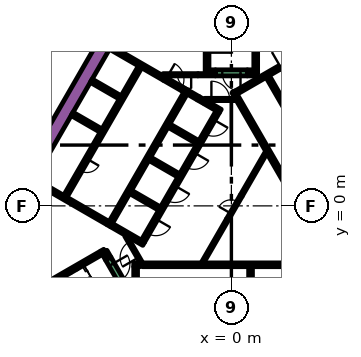
"""IFC4 building model, lengths in metres.
Left out: names, types, materials, properties, quantities, classifications, styles, units other than length and angle.
Written with IfcOpenShell. Run it as: python <this file> out.ifc"""

import sys

from ifc_helpers import new_model, si_unit, direction, frame, frame_2d, origin, place, context, subcontext, project, spatial, polyline, rectangle, outline, extrude, element, fill, save


model = new_model("IFC4")
c1 = context("Model", 3, precision=1e-05, world=origin(), true_north=direction((0.0, 1.0)))
c2 = subcontext(c1, "Body", "Model", "MODEL_VIEW")
j1 = project(units=[si_unit("LENGTHUNIT", "METRE"), si_unit("PLANEANGLEUNIT", "RADIAN")], contexts=[c1])
p1 = place(None, origin())
s1 = spatial("IfcSite", under=j1, at=p1, CompositionType="ELEMENT")
p2 = place(p1, origin())
s2 = spatial("IfcBuilding", under=s1, at=p2, CompositionType="ELEMENT")
p3 = place(p2, frame((0.0, 0.0, 6.0)))
s3 = spatial("IfcBuildingStorey", under=s2, at=p3, CompositionType="ELEMENT", Elevation=6.0)
p4 = place(p3, frame((-15.36, -1.503, 0.0), z_axis=(0.0, 0.0, 1.0), x_axis=(0.50000389221, 0.866023156604, 0.0)))
e1 = element("IfcWall", 1, at=p4, inside=s3, PredefinedType="SOLIDWALL", context=c2, shape_type="SweptSolid", body=[
    extrude(rectangle(XDim=21.0, YDim=0.9, at=frame_2d((10.5, 0.0))), origin(), (0.0, 0.0, 1.0), 5.4),
])
p5 = place(p3, frame((-12.134, -11.883, 0.0), z_axis=(0.0, 0.0, 1.0), x_axis=(-0.500005339912, 0.866022320763, 0.0)))
e2 = element("IfcWall", 2, at=p5, inside=s3, PredefinedType="SOLIDWALL", context=c2, shape_type="SweptSolid", body=[
    extrude(rectangle(XDim=9.488, YDim=0.9, at=frame_2d((4.744, 0.0))), origin(), (0.0, 0.0, 1.0), 5.4),
])
p6 = place(p3, frame((1.6, 8.95, 0.0), z_axis=(0.0, 0.0, 1.0), x_axis=(0.0, 1.0, 0.0)))
e3 = element("IfcWall", 3, at=p6, inside=s3, PredefinedType="SOLIDWALL", context=c2, shape_type="SweptSolid", body=[
    extrude(rectangle(XDim=6.8, YDim=0.25, at=frame_2d((3.4, 0.0))), origin(), (0.0, 0.0, 1.0), 5.4),
])
p7 = place(p3, frame((1.05, 8.825, 0.0), z_axis=(0.0, 0.0, 1.0), x_axis=(1.0, 0.0, 0.0)))
e4 = element("IfcWall", 4, at=p7, inside=s3, PredefinedType="SOLIDWALL", context=c2, shape_type="SweptSolid", body=[
    extrude(rectangle(XDim=0.675, YDim=0.25, at=frame_2d((0.337, 0.0))), origin(), (0.0, 0.0, 1.0), 5.4),
])
p8 = place(p3, frame((-1.6, 8.7, 0.0), z_axis=(0.0, 0.0, 1.0), x_axis=(0.0, 1.0, 0.0)))
e5 = element("IfcWall", 5, at=p8, inside=s3, PredefinedType="SOLIDWALL", context=c2, shape_type="SweptSolid", body=[
    extrude(rectangle(XDim=7.05, YDim=0.25, at=frame_2d((3.525, 0.0))), origin(), (0.0, 0.0, 1.0), 5.4),
])
p9 = place(p3, frame((-1.475, 8.825, 0.0), z_axis=(0.0, 0.0, 1.0), x_axis=(1.0, 0.0, 0.0)))
e6 = element("IfcWall", 6, at=p9, inside=s3, PredefinedType="SOLIDWALL", context=c2, shape_type="SweptSolid", body=[
    extrude(rectangle(XDim=0.425, YDim=0.25, at=frame_2d((0.212, 0.0))), origin(), (0.0, 0.0, 1.0), 5.4),
])
p10 = place(p3, frame((-14.44, -6.49, 0.0), z_axis=(0.0, 0.0, 1.0), x_axis=(0.866022966069, 0.500004222222, 0.0)))
e7 = element("IfcWall", 7, at=p10, inside=s3, PredefinedType="SOLIDWALL", context=c2, shape_type="SweptSolid", body=[
    extrude(rectangle(XDim=6.8, YDim=0.25, at=frame_2d((3.4, 0.0))), origin(), (0.0, 0.0, 1.0), 5.4),
])
p11 = place(p3, frame((-8.168, -3.503, 0.0), z_axis=(0.0, 0.0, 1.0), x_axis=(-0.499952099219, 0.866053057547, 0.0)))
e8 = element("IfcWall", 8, at=p11, inside=s3, PredefinedType="SOLIDWALL", context=c2, shape_type="SweptSolid", body=[
    extrude(rectangle(XDim=0.675, YDim=0.25, at=frame_2d((0.337, 0.0))), origin(), (0.0, 0.0, 1.0), 5.4),
])
p12 = place(p3, frame((-5.845, -3.875, 0.0), z_axis=(0.0, 0.0, 1.0), x_axis=(1.0, 0.0, 0.0)))
e9 = element("IfcWall", 9, at=p12, inside=s3, PredefinedType="SOLIDWALL", context=c2, shape_type="SweptSolid", body=[
    extrude(rectangle(XDim=12.27, YDim=0.25, at=frame_2d((6.135, 0.0))), origin(), (0.0, 0.0, 1.0), 5.4),
])
p13 = place(p3, frame((-6.425, -3.875, 0.0), z_axis=(0.0, 0.0, 1.0), x_axis=(1.0, 0.0, 0.0)))
e10 = element("IfcWall", 10, at=p13, inside=s3, PredefinedType="SOLIDWALL", context=c2, shape_type="SweptSolid", body=[
    extrude(rectangle(XDim=0.428, YDim=0.25, at=frame_2d((0.214, 0.0))), origin(), (0.0, 0.0, 1.0), 5.4),
])
p14 = place(p3, frame((1.26, -4.0, 0.0), z_axis=(0.0, 0.0, 1.0), x_axis=(0.0, -1.0, 0.0)))
e11 = element("IfcWall", 11, at=p14, inside=s3, PredefinedType="SOLIDWALL", context=c2, shape_type="SweptSolid", body=[
    extrude(rectangle(XDim=2.2, YDim=0.25, at=frame_2d((1.1, 0.0))), origin(), (0.0, 0.0, 1.0), 5.4),
])
p15 = place(p3, frame((-6.3, -4.0, 0.0), z_axis=(0.0, 0.0, 1.0), x_axis=(0.0, -1.0, 0.0)))
e12 = element("IfcWall", 12, at=p15, inside=s3, PredefinedType="SOLIDWALL", context=c2, shape_type="SweptSolid", body=[
    extrude(rectangle(XDim=3.154, YDim=0.25, at=frame_2d((1.577, 0.0))), origin(), (0.0, 0.0, 1.0), 5.4),
])
p16 = place(p3, origin())
e13 = element("IfcWall", 13, at=p16, inside=s3, PredefinedType="SOLIDWALL", context=c2, shape_type="SweptSolid", body=[
    extrude(outline(polyline([(6.552, -3.348), (6.677, -3.564), (6.46, -3.689), (4.897, -0.981), (0.332, 6.925), (0.335, 6.925), (0.335, 6.925), (0.335, 6.925), (0.335, 7.075), (0.335, 7.075), (0.335, 7.075), (0.245, 7.075), (0.079, 7.363), (0.035, 7.439), (0.252, 7.564), (0.377, 7.348), (6.552, -3.348)])), origin(), (0.0, 0.0, 1.0), 5.4),
])
p17 = place(p3, frame((0.314, 7.456, 0.0), z_axis=(0.0, 0.0, 1.0), x_axis=(0.866013897511, 0.50001992892, 0.0)))
e14 = element("IfcWall", 14, at=p17, inside=s3, PredefinedType="SOLIDWALL", context=c2, shape_type="SweptSolid", body=[
    extrude(rectangle(XDim=3.268, YDim=0.25, at=frame_2d((1.634, 0.0))), origin(), (0.0, 0.0, 1.0), 5.4),
])
p18 = place(p3, frame((-8.06, -1.311, 0.0), z_axis=(0.0, 0.0, 1.0), x_axis=(0.50000273126, 0.866023826885, 0.0)))
e15 = element("IfcWall", 15, at=p18, inside=s3, PredefinedType="SOLIDWALL", context=c2, shape_type="SweptSolid", body=[
    extrude(rectangle(XDim=10.33, YDim=0.25, at=frame_2d((5.165, 0.0))), origin(), (0.0, 0.0, 1.0), 5.4),
])
p19 = place(p3, frame((-1.819, 6.87, 0.0), z_axis=(0.0, 0.0, 1.0), x_axis=(-0.866294599386, 0.499533449405, 0.0)))
e16 = element("IfcWall", 16, at=p19, inside=s3, PredefinedType="SOLIDWALL", context=c2, shape_type="SweptSolid", body=[
    extrude(rectangle(XDim=0.41, YDim=0.25, at=frame_2d((0.205, 0.0))), origin(), (0.0, 0.0, 1.0), 5.4),
])
p20 = place(p3, frame((-2.849, 7.465, 0.0), z_axis=(0.0, 0.0, 1.0), x_axis=(0.865955664968, -0.500120771724, 0.0)))
e17 = element("IfcWall", 17, at=p20, inside=s3, PredefinedType="SOLIDWALL", context=c2, shape_type="SweptSolid", body=[
    extrude(rectangle(XDim=0.778, YDim=0.25, at=frame_2d((0.389, 0.0))), origin(), (0.0, 0.0, 1.0), 5.4),
])
p21 = place(p3, frame((-0.728, 6.24, 0.0), z_axis=(0.0, 0.0, 1.0), x_axis=(-0.866002680491, 0.500039355833, 0.0)))
e18 = element("IfcWall", 18, at=p21, inside=s3, PredefinedType="SOLIDWALL", context=c2, shape_type="SweptSolid", body=[
    extrude(rectangle(XDim=1.178, YDim=0.25, at=frame_2d((0.589, 0.0))), origin(), (0.0, 0.0, 1.0), 5.4),
])
for number, where, z_axis, x_axis in (
    (19, (-2.204, 4.182, 0.0), (0.0, 0.0, 1.0), (-0.866, 0.5, 0.0)),
    (20, (-5.369, 3.1, 0.0), (0.0, 0.0, 1.0), (0.866, -0.5, 0.0)),
    (21, (-4.724, -0.182, 0.0), (0.0, 0.0, 1.0), (-0.866, 0.5, 0.0)),
):
    element("IfcWall", number, at=place(p3, frame(where, z_axis=z_axis, x_axis=x_axis)), inside=s3, PredefinedType="SOLIDWALL", context=c2, shape_type="SweptSolid", body=[
        extrude(rectangle(XDim=2.2, YDim=0.25, at=frame_2d((1.1, 0.0))), origin(), (0.0, 0.0, 1.0), 5.4),
    ])
e22 = element("IfcWall", 22, at=p16, inside=s3, PredefinedType="SOLIDWALL", context=c2, shape_type="SweptSolid", body=[
    extrude(outline(polyline([(-5.922, -2.257), (-5.922, -2.257), (-5.705, -2.382), (-5.83, -2.598), (-6.829, -2.021), (-6.88, -1.934), (-6.88, -1.934), (-6.93, -1.963), (-7.952, -1.373), (-7.827, -1.156), (-5.922, -2.257)])), origin(), (0.0, 0.0, 1.0), 5.4),
])
p22 = place(p3, frame((-8.106, -1.14, 0.0), z_axis=(0.0, 0.0, 1.0), x_axis=(-0.866000643155, 0.500042884217, 0.0)))
e23 = element("IfcWall", 23, at=p22, inside=s3, PredefinedType="SOLIDWALL", context=c2, shape_type="SweptSolid", body=[
    extrude(rectangle(XDim=5.65, YDim=0.25, at=frame_2d((2.825, 0.0))), origin(), (0.0, 0.0, 1.0), 5.4),
])
e24 = element("IfcWall", 24, at=p16, inside=s3, PredefinedType="SOLIDWALL", context=c2, shape_type="SweptSolid", body=[
    extrude(outline(polyline([(-3.128, 7.481), (-3.259, 7.557), (-3.134, 7.773), (-3.003, 7.698), (-3.128, 7.481)])), origin(), (0.0, 0.0, 1.0), 5.4),
])
for number, where, z_axis, x_axis in (
    (25, (-8.574, 4.95, 0.0), (0.0, 0.0, 1.0), (-0.866, 0.5, 0.0)),
    (26, (-7.314, 7.132, 0.0), (0.0, 0.0, 1.0), (-0.866, 0.5, 0.0)),
):
    element("IfcWall", number, at=place(p3, frame(where, z_axis=z_axis, x_axis=x_axis)), inside=s3, PredefinedType="SOLIDWALL", context=c2, shape_type="SweptSolid", body=[
        extrude(rectangle(XDim=2.2, YDim=0.25, at=frame_2d((1.1, 0.0))), origin(), (0.0, 0.0, 1.0), 5.4),
    ])
p23 = place(p3, frame((-7.959, 10.415, 0.0), z_axis=(0.0, 0.0, 1.0), x_axis=(0.866020958405, -0.500007699544, 0.0)))
e27 = element("IfcWall", 27, at=p23, inside=s3, PredefinedType="SOLIDWALL", context=c2, shape_type="SweptSolid", body=[
    extrude(rectangle(XDim=4.1, YDim=0.25, at=frame_2d((2.05, 0.0))), origin(), (0.0, 0.0, 1.0), 5.4),
])
p24 = place(p3, frame((-8.252, -2.958, 0.0), z_axis=(0.0, 0.0, 1.0), x_axis=(0.500174715838, -0.865924508047, 0.0)))
e28 = element("IfcWall", 28, at=p24, inside=s3, PredefinedType="PARTITIONING", context=c2, shape_type="SweptSolid", body=[
    extrude(rectangle(XDim=0.514, YDim=0.15, at=frame_2d((0.257, 0.0))), origin(), (0.0, 0.0, 1.0), 4.5),
])
p25 = place(p3, frame((-3.997, 8.625, 0.0), z_axis=(0.0, 0.0, 1.0), x_axis=(-1.0, 0.0, 0.0)))
e29 = element("IfcWall", 29, at=p25, inside=s3, PredefinedType="PARTITIONING", context=c2, shape_type="SweptSolid", body=[
    extrude(rectangle(XDim=0.502, YDim=0.15, at=frame_2d((0.251, 0.0))), origin(), (0.0, 0.0, 1.0), 4.5),
])
p26 = place(p3, frame((-2.196, 8.625, 0.0), z_axis=(0.0, 0.0, 1.0), x_axis=(1.0, 0.0, 0.0)))
e30 = element("IfcWall", 30, at=p26, inside=s3, PredefinedType="PARTITIONING", context=c2, shape_type="SweptSolid", body=[
    extrude(rectangle(XDim=1.146, YDim=0.15, at=frame_2d((0.573, 0.0))), origin(), (0.0, 0.0, 1.0), 4.5),
])
for number, where, z_axis, x_axis in (
    (31, (-1.887, -3.718, 0.0), (0.0, 0.0, 1.0), (0.5, 0.866, 0.0)),
    (32, (0.645, 0.667, 0.0), (0.0, 0.0, 1.0), (0.5, 0.866, 0.0)),
):
    element("IfcWall", number, at=place(p3, frame(where, z_axis=z_axis, x_axis=x_axis)), inside=s3, PredefinedType="PARTITIONING", context=c2, shape_type="SweptSolid", body=[
        extrude(rectangle(XDim=3.263, YDim=0.15, at=frame_2d((1.632, 0.0))), origin(), (0.0, 0.0, 1.0), 4.5),
    ])
p27 = place(p3, frame((1.05, 8.625, 0.0), z_axis=(0.0, 0.0, 1.0), x_axis=(1.0, 0.0, 0.0)))
e33 = element("IfcWall", 33, at=p27, inside=s3, PredefinedType="PARTITIONING", context=c2, shape_type="SweptSolid", body=[
    extrude(rectangle(XDim=0.514, YDim=0.15, at=frame_2d((0.257, 0.0))), origin(), (0.0, 0.0, 1.0), 4.5),
])
p28 = place(p3, frame((8.565, -2.185, 0.0), z_axis=(0.0, 0.0, 1.0), x_axis=(-0.499997954832, 0.866026584559, 0.0)))
e34 = element("IfcWall", 34, at=p28, inside=s3, PredefinedType="SOLIDWALL", context=c2, shape_type="SweptSolid", body=[
    extrude(rectangle(XDim=12.35, YDim=0.25, at=frame_2d((6.175, 0.0))), origin(), (0.0, 0.0, 1.0), 5.4),
])
p29 = place(p28, frame((5.725, 0.0, 0.0)))
e35 = element("IfcOpeningElement", 35, at=p29, cuts=e34, PredefinedType="OPENING", context=c2, shape_type="SweptSolid", body=[
    extrude(rectangle(XDim=0.9, YDim=2.1, at=frame_2d((0.45, 1.05))), frame((0.0, 0.135, 0.0), z_axis=(0.0, -1.0, 0.0), x_axis=(1.0, 0.0, 0.0)), (0.0, 0.0, 1.0), 0.27),
])
p30 = place(p3, frame((-6.008, 9.144, 0.0), z_axis=(0.0, 0.0, 1.0), x_axis=(-0.500006956611, -0.866021387346, 0.0)))
e36 = element("IfcWall", 36, at=p30, inside=s3, PredefinedType="SOLIDWALL", context=c2, shape_type="SweptSolid", body=[
    extrude(rectangle(XDim=9.83, YDim=0.25, at=frame_2d((4.915, 0.0))), origin(), (0.0, 0.0, 1.0), 5.4),
])
p31 = place(p30, frame((6.985, 0.0, 0.0)))
e37 = element("IfcOpeningElement", 37, at=p31, cuts=e36, PredefinedType="OPENING", context=c2, shape_type="SweptSolid", body=[
    extrude(rectangle(XDim=0.9, YDim=2.1, at=frame_2d((0.45, 1.05))), frame((0.0, 0.135, 0.0), z_axis=(0.0, -1.0, 0.0), x_axis=(1.0, 0.0, 0.0)), (0.0, 0.0, 1.0), 0.27),
])
p32 = place(p3, frame((-0.898, 6.194, 0.0), z_axis=(0.0, 0.0, 1.0), x_axis=(-0.499996202215, -0.866027596426, 0.0)))
e38 = element("IfcWall", 38, at=p32, inside=s3, PredefinedType="SOLIDWALL", context=c2, shape_type="SweptSolid", body=[
    extrude(rectangle(XDim=9.83, YDim=0.25, at=frame_2d((4.915, 0.0))), origin(), (0.0, 0.0, 1.0), 5.4),
])
p33 = place(p32, frame((0.585, 0.0, 0.0)))
e39 = element("IfcOpeningElement", 39, at=p33, cuts=e38, PredefinedType="OPENING", context=c2, shape_type="SweptSolid", body=[
    extrude(rectangle(XDim=1.1, YDim=2.1, at=frame_2d((0.55, 1.05))), frame((0.0, 0.135, 0.0), z_axis=(0.0, -1.0, 0.0), x_axis=(1.0, 0.0, 0.0)), (0.0, 0.0, 1.0), 0.27),
])
p34 = place(p32, frame((3.105, 0.0, 0.0)))
e40 = element("IfcOpeningElement", 40, at=p34, cuts=e38, PredefinedType="OPENING", context=c2, shape_type="SweptSolid", body=[
    extrude(rectangle(XDim=1.1, YDim=2.1, at=frame_2d((0.55, 1.05))), frame((0.0, 0.135, 0.0), z_axis=(0.0, -1.0, 0.0), x_axis=(1.0, 0.0, 0.0)), (0.0, 0.0, 1.0), 0.27),
])
p35 = place(p32, frame((5.625, 0.0, 0.0)))
e41 = element("IfcOpeningElement", 41, at=p35, cuts=e38, PredefinedType="OPENING", context=c2, shape_type="SweptSolid", body=[
    extrude(rectangle(XDim=1.1, YDim=2.1, at=frame_2d((0.55, 1.05))), frame((0.0, 0.135, 0.0), z_axis=(0.0, -1.0, 0.0), x_axis=(1.0, 0.0, 0.0)), (0.0, 0.0, 1.0), 0.27),
])
p36 = place(p32, frame((8.145, 0.0, 0.0)))
e42 = element("IfcOpeningElement", 42, at=p36, cuts=e38, PredefinedType="OPENING", context=c2, shape_type="SweptSolid", body=[
    extrude(rectangle(XDim=1.1, YDim=2.1, at=frame_2d((0.55, 1.05))), frame((0.0, 0.135, 0.0), z_axis=(0.0, -1.0, 0.0), x_axis=(1.0, 0.0, 0.0)), (0.0, 0.0, 1.0), 0.27),
])
p37 = place(p3, frame((1.05, 8.75, 0.0), z_axis=(0.0, 0.0, 1.0), x_axis=(-1.0, 0.0, 0.0)))
e43 = element("IfcWall", 43, at=p37, inside=s3, PredefinedType="SOLIDWALL", context=c2, shape_type="SweptSolid", body=[
    extrude(rectangle(XDim=2.1, YDim=0.4, at=frame_2d((1.05, 0.0))), origin(), (0.0, 0.0, 1.0), 5.4),
])
p38 = place(p37, frame((0.45, 0.0, 0.0)))
e44 = element("IfcOpeningElement", 44, at=p38, cuts=e43, PredefinedType="OPENING", context=c2, shape_type="SweptSolid", body=[
    extrude(rectangle(XDim=1.2, YDim=2.1, at=frame_2d((0.6, 1.05))), frame((0.0, 0.21, 0.0), z_axis=(0.0, -1.0, 0.0), x_axis=(1.0, 0.0, 0.0)), (0.0, 0.0, 1.0), 0.42),
])
p39 = place(p3, frame((-2.196, 8.625, 0.0), z_axis=(0.0, 0.0, 1.0), x_axis=(-1.0, 0.0, 0.0)))
e45 = element("IfcWall", 45, at=p39, inside=s3, PredefinedType="PARTITIONING", context=c2, shape_type="SweptSolid", body=[
    extrude(rectangle(XDim=1.8, YDim=0.15, at=frame_2d((0.9, 0.0))), origin(), (0.0, 0.0, 1.0), 4.5),
])
p40 = place(p39, frame((0.45, 0.0, 0.0)))
e46 = element("IfcOpeningElement", 46, at=p40, cuts=e45, PredefinedType="OPENING", context=c2, shape_type="SweptSolid", body=[
    extrude(rectangle(XDim=0.9, YDim=2.1, at=frame_2d((0.45, 1.05))), frame((0.0, 0.085, 0.0), z_axis=(0.0, -1.0, 0.0), x_axis=(1.0, 0.0, 0.0)), (0.0, 0.0, 1.0), 0.17),
])
p41 = place(p3, frame((-8.103, -3.466, 0.0), z_axis=(0.0, 0.0, 1.0), x_axis=(0.500078061341, -0.865980330357, 0.0)))
e47 = element("IfcWall", 47, at=p41, inside=s3, PredefinedType="SOLIDWALL", context=c2, shape_type="SweptSolid", body=[
    extrude(rectangle(XDim=2.1, YDim=0.4, at=frame_2d((1.05, 0.0))), origin(), (0.0, 0.0, 1.0), 5.4),
])
p42 = place(p41, frame((0.45, 0.0, 0.0)))
e48 = element("IfcOpeningElement", 48, at=p42, cuts=e47, PredefinedType="OPENING", context=c2, shape_type="SweptSolid", body=[
    extrude(rectangle(XDim=1.2, YDim=2.1, at=frame_2d((0.6, 1.05))), frame((0.0, 0.21, 0.0), z_axis=(0.0, -1.0, 0.0), x_axis=(1.0, 0.0, 0.0)), (0.0, 0.0, 1.0), 0.42),
])
p43 = place(p3, frame((-1.765, 7.0, 0.0), z_axis=(0.0, 0.0, 1.0), x_axis=(1.0, 0.0, 0.0)))
e49 = element("IfcWall", 49, at=p43, inside=s3, PredefinedType="PARTITIONING", context=c2, shape_type="SweptSolid", body=[
    extrude(rectangle(XDim=2.1, YDim=0.15, at=frame_2d((1.05, 0.0))), origin(), (0.0, 0.0, 1.0), 4.5),
])
p44 = place(p43, frame((0.45, 0.0, 0.0)))
e50 = element("IfcOpeningElement", 50, at=p44, cuts=e49, PredefinedType="OPENING", context=c2, shape_type="SweptSolid", body=[
    extrude(rectangle(XDim=1.2, YDim=2.1, at=frame_2d((0.6, 1.05))), frame((0.0, 0.085, 0.0), z_axis=(0.0, -1.0, 0.0), x_axis=(1.0, 0.0, 0.0)), (0.0, 0.0, 1.0), 0.17),
])
p45 = place(p3, frame((-5.895, -3.79, 0.0), z_axis=(0.0, 0.0, 1.0), x_axis=(-0.49994051562, 0.866059744384, 0.0)))
e51 = element("IfcWall", 51, at=p45, inside=s3, PredefinedType="PARTITIONING", context=c2, shape_type="SweptSolid", body=[
    extrude(rectangle(XDim=2.1, YDim=0.15, at=frame_2d((1.05, 0.0))), origin(), (0.0, 0.0, 1.0), 4.5),
])
p46 = place(p45, frame((0.45, 0.0, 0.0)))
e52 = element("IfcOpeningElement", 52, at=p46, cuts=e51, PredefinedType="OPENING", context=c2, shape_type="SweptSolid", body=[
    extrude(rectangle(XDim=1.2, YDim=2.1, at=frame_2d((0.6, 1.05))), frame((0.0, 0.085, 0.0), z_axis=(0.0, -1.0, 0.0), x_axis=(1.0, 0.0, 0.0)), (0.0, 0.0, 1.0), 0.17),
])
p47 = place(p3, frame((3.183, 9.02, 0.0), z_axis=(0.0, 0.0, 1.0), x_axis=(0.866034573852, 0.49998411664, 0.0)))
e53 = element("IfcWall", 53, at=p47, inside=s3, PredefinedType="PARTITIONING", context=c2, shape_type="SweptSolid", body=[
    extrude(rectangle(XDim=1.4, YDim=0.09, at=frame_2d((0.7, 0.0))), origin(), (0.0, 0.0, 1.0), 4.5),
])
p48 = place(p47, frame((0.1, 0.0, 0.0)))
e54 = element("IfcOpeningElement", 54, at=p48, cuts=e53, PredefinedType="OPENING", context=c2, shape_type="SweptSolid", body=[
    extrude(rectangle(XDim=1.2, YDim=2.1, at=frame_2d((0.6, 1.05))), frame((0.0, 0.055, 0.0), z_axis=(0.0, -1.0, 0.0), x_axis=(1.0, 0.0, 0.0)), (0.0, 0.0, 1.0), 0.11),
])
p49 = place(p3, frame((-4.409, 8.365, 0.0), z_axis=(0.0, 0.0, 1.0), x_axis=(0.866034573852, -0.49998411664, 0.0)))
e55 = element("IfcWall", 55, at=p49, inside=s3, PredefinedType="SOLIDWALL", context=c2, shape_type="SweptSolid", body=[
    extrude(rectangle(XDim=1.4, YDim=0.25, at=frame_2d((0.7, 0.0))), origin(), (0.0, 0.0, 1.0), 5.4),
])
p50 = place(p49, frame((0.1, 0.0, 0.0)))
e56 = element("IfcOpeningElement", 56, at=p50, cuts=e55, PredefinedType="OPENING", context=c2, shape_type="SweptSolid", body=[
    extrude(rectangle(XDim=1.2, YDim=2.1, at=frame_2d((0.6, 1.05))), frame((0.0, 0.135, 0.0), z_axis=(0.0, -1.0, 0.0), x_axis=(1.0, 0.0, 0.0)), (0.0, 0.0, 1.0), 0.27),
])
p51 = place(p3, frame((-0.255, -0.892, 0.0), z_axis=(0.0, 0.0, 1.0), x_axis=(0.500062916607, 0.865989075817, 0.0)))
e57 = element("IfcWall", 57, at=p51, inside=s3, PredefinedType="PARTITIONING", context=c2, shape_type="SweptSolid", body=[
    extrude(rectangle(XDim=1.8, YDim=0.15, at=frame_2d((0.9, 0.0))), origin(), (0.0, 0.0, 1.0), 4.5),
])
p52 = place(p51, frame((0.45, 0.0, 0.0)))
e58 = element("IfcOpeningElement", 58, at=p52, cuts=e57, PredefinedType="OPENING", context=c2, shape_type="SweptSolid", body=[
    extrude(rectangle(XDim=0.9, YDim=2.1, at=frame_2d((0.45, 1.05))), frame((0.0, 0.085, 0.0), z_axis=(0.0, -1.0, 0.0), x_axis=(1.0, 0.0, 0.0)), (0.0, 0.0, 1.0), 0.17),
])
p53 = place(p31, origin())
e59 = element("IfcDoor", 59, at=p53, inside=s3, OperationType="SINGLE_SWING_LEFT", PredefinedType="DOOR", context=c2, shape_type="SweptSolid", body=[
    extrude(rectangle(XDim=0.9, YDim=2.1, at=frame_2d((0.45, 1.05))), frame((0.0, 0.025, 0.0), z_axis=(0.0, -1.0, 0.0), x_axis=(1.0, 0.0, 0.0)), (0.0, 0.0, 1.0), 0.05),
])
fill(e37, e59)
p54 = place(p33, origin())
e60 = element("IfcDoor", 60, at=p54, inside=s3, OperationType="DOUBLE_DOOR_SLIDING", PredefinedType="DOOR", context=c2, shape_type="SweptSolid", body=[
    extrude(rectangle(XDim=1.1, YDim=2.1, at=frame_2d((0.55, 1.05))), frame((0.0, 0.025, 0.0), z_axis=(0.0, -1.0, 0.0), x_axis=(1.0, 0.0, 0.0)), (0.0, 0.0, 1.0), 0.05),
])
fill(e39, e60)
p55 = place(p34, origin())
e61 = element("IfcDoor", 61, at=p55, inside=s3, OperationType="DOUBLE_DOOR_SLIDING", PredefinedType="DOOR", context=c2, shape_type="SweptSolid", body=[
    extrude(rectangle(XDim=1.1, YDim=2.1, at=frame_2d((0.55, 1.05))), frame((0.0, 0.025, 0.0), z_axis=(0.0, -1.0, 0.0), x_axis=(1.0, 0.0, 0.0)), (0.0, 0.0, 1.0), 0.05),
])
fill(e40, e61)
p56 = place(p35, origin())
e62 = element("IfcDoor", 62, at=p56, inside=s3, OperationType="DOUBLE_DOOR_SLIDING", PredefinedType="DOOR", context=c2, shape_type="SweptSolid", body=[
    extrude(rectangle(XDim=1.1, YDim=2.1, at=frame_2d((0.55, 1.05))), frame((0.0, 0.025, 0.0), z_axis=(0.0, -1.0, 0.0), x_axis=(1.0, 0.0, 0.0)), (0.0, 0.0, 1.0), 0.05),
])
fill(e41, e62)
p57 = place(p36, origin())
e63 = element("IfcDoor", 63, at=p57, inside=s3, OperationType="DOUBLE_DOOR_SLIDING", PredefinedType="DOOR", context=c2, shape_type="SweptSolid", body=[
    extrude(rectangle(XDim=1.1, YDim=2.1, at=frame_2d((0.55, 1.05))), frame((0.0, 0.025, 0.0), z_axis=(0.0, -1.0, 0.0), x_axis=(1.0, 0.0, 0.0)), (0.0, 0.0, 1.0), 0.05),
])
fill(e42, e63)
p58 = place(p38, origin())
e64 = element("IfcDoor", 64, at=p58, inside=s3, OperationType="SINGLE_SWING_LEFT", PredefinedType="DOOR", context=c2, shape_type="SweptSolid", body=[
    extrude(rectangle(XDim=1.2, YDim=2.1, at=frame_2d((0.6, 1.05))), frame((0.0, 0.025, 0.0), z_axis=(0.0, -1.0, 0.0), x_axis=(1.0, 0.0, 0.0)), (0.0, 0.0, 1.0), 0.05),
])
fill(e44, e64)
p59 = place(p40, origin())
e65 = element("IfcDoor", 65, at=p59, inside=s3, OperationType="SINGLE_SWING_LEFT", PredefinedType="DOOR", context=c2, shape_type="SweptSolid", body=[
    extrude(rectangle(XDim=0.9, YDim=2.1, at=frame_2d((0.45, 1.05))), frame((0.0, 0.025, 0.0), z_axis=(0.0, -1.0, 0.0), x_axis=(1.0, 0.0, 0.0)), (0.0, 0.0, 1.0), 0.05),
])
fill(e46, e65)
p60 = place(p42, origin())
e66 = element("IfcDoor", 66, at=p60, inside=s3, OperationType="SINGLE_SWING_LEFT", PredefinedType="DOOR", context=c2, shape_type="SweptSolid", body=[
    extrude(rectangle(XDim=1.2, YDim=2.1, at=frame_2d((0.6, 1.05))), frame((0.0, 0.025, 0.0), z_axis=(0.0, -1.0, 0.0), x_axis=(1.0, 0.0, 0.0)), (0.0, 0.0, 1.0), 0.05),
])
fill(e48, e66)
p61 = place(p44, origin())
e67 = element("IfcDoor", 67, at=p61, inside=s3, OperationType="SINGLE_SWING_LEFT", PredefinedType="DOOR", context=c2, shape_type="SweptSolid", body=[
    extrude(rectangle(XDim=1.2, YDim=2.1, at=frame_2d((0.6, 1.05))), frame((0.0, 0.025, 0.0), z_axis=(0.0, -1.0, 0.0), x_axis=(1.0, 0.0, 0.0)), (0.0, 0.0, 1.0), 0.05),
])
fill(e50, e67)
p62 = place(p46, origin())
e68 = element("IfcDoor", 68, at=p62, inside=s3, OperationType="SINGLE_SWING_LEFT", PredefinedType="DOOR", context=c2, shape_type="SweptSolid", body=[
    extrude(rectangle(XDim=1.2, YDim=2.1, at=frame_2d((0.6, 1.05))), frame((0.0, 0.025, 0.0), z_axis=(0.0, -1.0, 0.0), x_axis=(1.0, 0.0, 0.0)), (0.0, 0.0, 1.0), 0.05),
])
fill(e52, e68)
p63 = place(p50, origin())
e69 = element("IfcDoor", 69, at=p63, inside=s3, OperationType="SINGLE_SWING_LEFT", PredefinedType="DOOR", context=c2, shape_type="SweptSolid", body=[
    extrude(rectangle(XDim=1.2, YDim=2.1, at=frame_2d((0.6, 1.05))), frame((0.0, 0.025, 0.0), z_axis=(0.0, -1.0, 0.0), x_axis=(1.0, 0.0, 0.0)), (0.0, 0.0, 1.0), 0.05),
])
fill(e56, e69)
p64 = place(p52, origin())
e70 = element("IfcDoor", 70, at=p64, inside=s3, OperationType="SINGLE_SWING_LEFT", PredefinedType="DOOR", context=c2, shape_type="SweptSolid", body=[
    extrude(rectangle(XDim=0.9, YDim=2.1, at=frame_2d((0.45, 1.05))), frame((0.0, 0.025, 0.0), z_axis=(0.0, -1.0, 0.0), x_axis=(1.0, 0.0, 0.0)), (0.0, 0.0, 1.0), 0.05),
])
fill(e58, e70)
save(model, sys.argv[1])
